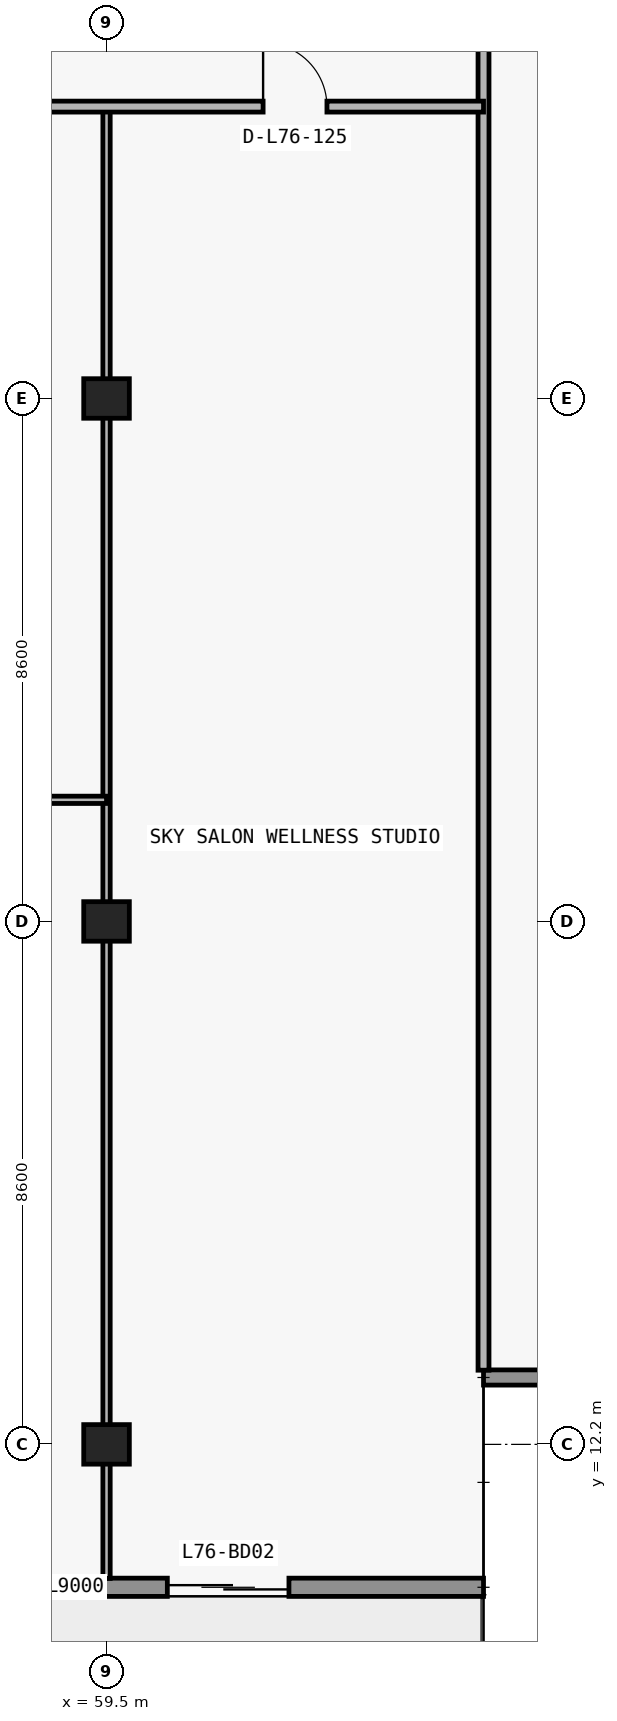
"""IFC4 building model, lengths in metres.
Left out: names, types, materials, properties, quantities, classifications, styles, units other than length and angle.
Written with IfcOpenShell. Run it as: python <this file> out.ifc"""

import sys

from ifc_helpers import new_model, si_unit, direction, frame, frame_2d, origin, origin_2d, place, context, subcontext, project, spatial, rectangle, extrude, element, fill, save


model = new_model("IFC4")
c1 = context("Model", 3, precision=1e-05, world=origin(), true_north=direction((0.0, 1.0)))
c2 = subcontext(c1, "Body", "Model", "MODEL_VIEW")
j1 = project(units=[si_unit("LENGTHUNIT", "METRE"), si_unit("PLANEANGLEUNIT", "RADIAN")], contexts=[c1])
p1 = place(None, origin())
s1 = spatial("IfcSite", under=j1, at=p1, CompositionType="ELEMENT")
p2 = place(p1, origin())
s2 = spatial("IfcBuilding", under=s1, at=p2, CompositionType="ELEMENT")
p3 = place(p2, frame((0.0, 0.0, 269.4)))
s3 = spatial("IfcBuildingStorey", under=s2, at=p3, CompositionType="ELEMENT", Elevation=269.4)
for number, where, z_axis, x_axis in (
    (1, (59.5, 12.2, 0.0), (0.0, 0.0, 1.0), (1.0, 0.0, 0.0)),
    (2, (59.5, 20.8, 0.0), (0.0, 0.0, 1.0), (1.0, 0.0, 0.0)),
    (3, (59.5, 29.4, 0.0), (0.0, 0.0, 1.0), (1.0, 0.0, 0.0)),
):
    element("IfcColumn", number, at=place(p3, frame(where, z_axis=z_axis, x_axis=x_axis)), inside=s3, PredefinedType="COLUMN", context=c2, shape_type="SweptSolid", body=[
        extrude(rectangle(XDim=0.75, YDim=0.65, at=origin_2d()), origin(), (0.0, 0.0, 1.0), 4.5),
    ])
p4 = place(p3, frame((65.7, 9.85, 0.0), z_axis=(0.0, 0.0, 1.0), x_axis=(-1.0, 0.0, 0.0)))
e4 = element("IfcWall", 4, at=p4, inside=s3, PredefinedType="STANDARD", context=c2, shape_type="SweptSolid", body=[
    extrude(rectangle(XDim=9.0, YDim=0.3, at=frame_2d((4.5, 0.0))), origin(), (0.0, 0.0, 1.0), 4.5),
])
p5 = place(p4, frame((3.2, 0.0, 0.0)))
e5 = element("IfcOpeningElement", 5, at=p5, cuts=e4, PredefinedType="OPENING", context=c2, shape_type="SweptSolid", body=[
    extrude(rectangle(XDim=2.0, YDim=2.3, at=frame_2d((1.0, 1.15))), frame((0.0, 0.16, 0.0), z_axis=(0.0, -1.0, 0.0), x_axis=(1.0, 0.0, 0.0)), (0.0, 0.0, 1.0), 0.32),
])
p6 = place(p3, frame((65.7, 13.3, 0.0), z_axis=(0.0, 0.0, 1.0), x_axis=(1.0, 0.0, 0.0)))
e6 = element("IfcWall", 6, at=p6, inside=s3, PredefinedType="ELEMENTEDWALL", context=c2, shape_type="SweptSolid", body=[
    extrude(rectangle(XDim=3.85, YDim=0.25, at=frame_2d((1.925, 0.0))), origin(), (0.0, 0.0, 1.0), 4.5),
])
p7 = place(p3, frame((59.5, 9.995, 0.0), z_axis=(0.0, 0.0, 1.0), x_axis=(0.0, 1.0, 0.0)))
e7 = element("IfcWall", 7, at=p7, inside=s3, PredefinedType="PARTITIONING", context=c2, shape_type="SweptSolid", body=[
    extrude(rectangle(XDim=24.205, YDim=0.12, at=frame_2d((12.103, 0.0))), origin(), (0.0, 0.0, 1.0), 3.464),
])
p8 = place(p3, frame((65.7, 13.42, 0.0), z_axis=(0.0, 0.0, 1.0), x_axis=(0.0, 1.0, 0.0)))
e8 = element("IfcWall", 8, at=p8, inside=s3, PredefinedType="PARTITIONING", context=c2, shape_type="SweptSolid", body=[
    extrude(rectangle(XDim=33.46, YDim=0.18, at=frame_2d((16.73, 0.0))), origin(), (0.0, 0.0, 1.0), 4.5),
])
p9 = place(p3, frame((51.32, 22.8, 0.0), z_axis=(0.0, 0.0, 1.0), x_axis=(1.0, 0.0, 0.0)))
e9 = element("IfcWall", 9, at=p9, inside=s3, PredefinedType="PARTITIONING", context=c2, shape_type="SweptSolid", body=[
    extrude(rectangle(XDim=8.18, YDim=0.12, at=frame_2d((4.09, 0.0))), origin(), (0.0, 0.0, 1.0), 4.5),
])
p10 = place(p9, frame((3.64, 0.0, 0.0)))
e10 = element("IfcOpeningElement", 10, at=p10, cuts=e9, PredefinedType="OPENING", context=c2, shape_type="SweptSolid", body=[
    extrude(rectangle(XDim=0.9, YDim=2.15, at=frame_2d((0.45, 1.075))), frame((0.0, 0.07, 0.0), z_axis=(0.0, -1.0, 0.0), x_axis=(1.0, 0.0, 0.0)), (0.0, 0.0, 1.0), 0.14),
])
p11 = place(p3, frame((26.7, 34.2, 0.0), z_axis=(0.0, 0.0, 1.0), x_axis=(1.0, 0.0, 0.0)))
e11 = element("IfcWall", 11, at=p11, inside=s3, PredefinedType="PARTITIONING", context=c2, shape_type="SweptSolid", body=[
    extrude(rectangle(XDim=39.0, YDim=0.18, at=frame_2d((19.5, 0.0))), origin(), (0.0, 0.0, 1.0), 4.5),
])
p12 = place(p11, frame((28.075, 0.0, 0.0)))
e12 = element("IfcOpeningElement", 12, at=p12, cuts=e11, PredefinedType="OPENING", context=c2, shape_type="SweptSolid", body=[
    extrude(rectangle(XDim=1.05, YDim=2.15, at=frame_2d((0.525, 1.075))), frame((0.0, 0.1, 0.0), z_axis=(0.0, -1.0, 0.0), x_axis=(1.0, 0.0, 0.0)), (0.0, 0.0, 1.0), 0.2),
])
p13 = place(p11, frame((35.375, 0.0, 0.0)))
e13 = element("IfcOpeningElement", 13, at=p13, cuts=e11, PredefinedType="OPENING", context=c2, shape_type="SweptSolid", body=[
    extrude(rectangle(XDim=1.05, YDim=2.15, at=frame_2d((0.525, 1.075))), frame((0.0, 0.1, 0.0), z_axis=(0.0, -1.0, 0.0), x_axis=(1.0, 0.0, 0.0)), (0.0, 0.0, 1.0), 0.2),
])
p14 = place(p11, frame((3.675, 0.0, 0.0)))
e14 = element("IfcOpeningElement", 14, at=p14, cuts=e11, PredefinedType="OPENING", context=c2, shape_type="SweptSolid", body=[
    extrude(rectangle(XDim=1.05, YDim=2.15, at=frame_2d((0.525, 1.075))), frame((0.0, 0.1, 0.0), z_axis=(0.0, -1.0, 0.0), x_axis=(1.0, 0.0, 0.0)), (0.0, 0.0, 1.0), 0.2),
])
p15 = place(p11, frame((11.75, 0.0, 0.0)))
e15 = element("IfcOpeningElement", 15, at=p15, cuts=e11, PredefinedType="OPENING", context=c2, shape_type="SweptSolid", body=[
    extrude(rectangle(XDim=0.9, YDim=2.15, at=frame_2d((0.45, 1.075))), frame((0.0, 0.1, 0.0), z_axis=(0.0, -1.0, 0.0), x_axis=(1.0, 0.0, 0.0)), (0.0, 0.0, 1.0), 0.2),
])
p16 = place(p11, frame((19.75, 0.0, 0.0)))
e16 = element("IfcOpeningElement", 16, at=p16, cuts=e11, PredefinedType="OPENING", context=c2, shape_type="SweptSolid", body=[
    extrude(rectangle(XDim=0.9, YDim=2.15, at=frame_2d((0.45, 1.075))), frame((0.0, 0.1, 0.0), z_axis=(0.0, -1.0, 0.0), x_axis=(1.0, 0.0, 0.0)), (0.0, 0.0, 1.0), 0.2),
])
p17 = place(p5, origin())
e17 = element("IfcDoor", 17, at=p17, inside=s3, OperationType="DOUBLE_DOOR_SLIDING", PredefinedType="DOOR", context=c2, shape_type="SweptSolid", body=[
    extrude(rectangle(XDim=2.0, YDim=2.3, at=frame_2d((1.0, 1.15))), frame((0.0, 0.025, 0.0), z_axis=(0.0, -1.0, 0.0), x_axis=(1.0, 0.0, 0.0)), (0.0, 0.0, 1.0), 0.05),
])
fill(e5, e17)
p18 = place(p13, origin())
e18 = element("IfcDoor", 18, at=p18, inside=s3, OperationType="SINGLE_SWING_LEFT", PredefinedType="DOOR", context=c2, shape_type="SweptSolid", body=[
    extrude(rectangle(XDim=1.05, YDim=2.15, at=frame_2d((0.525, 1.075))), frame((0.0, 0.025, 0.0), z_axis=(0.0, -1.0, 0.0), x_axis=(1.0, 0.0, 0.0)), (0.0, 0.0, 1.0), 0.05),
])
fill(e13, e18)
save(model, sys.argv[1])
